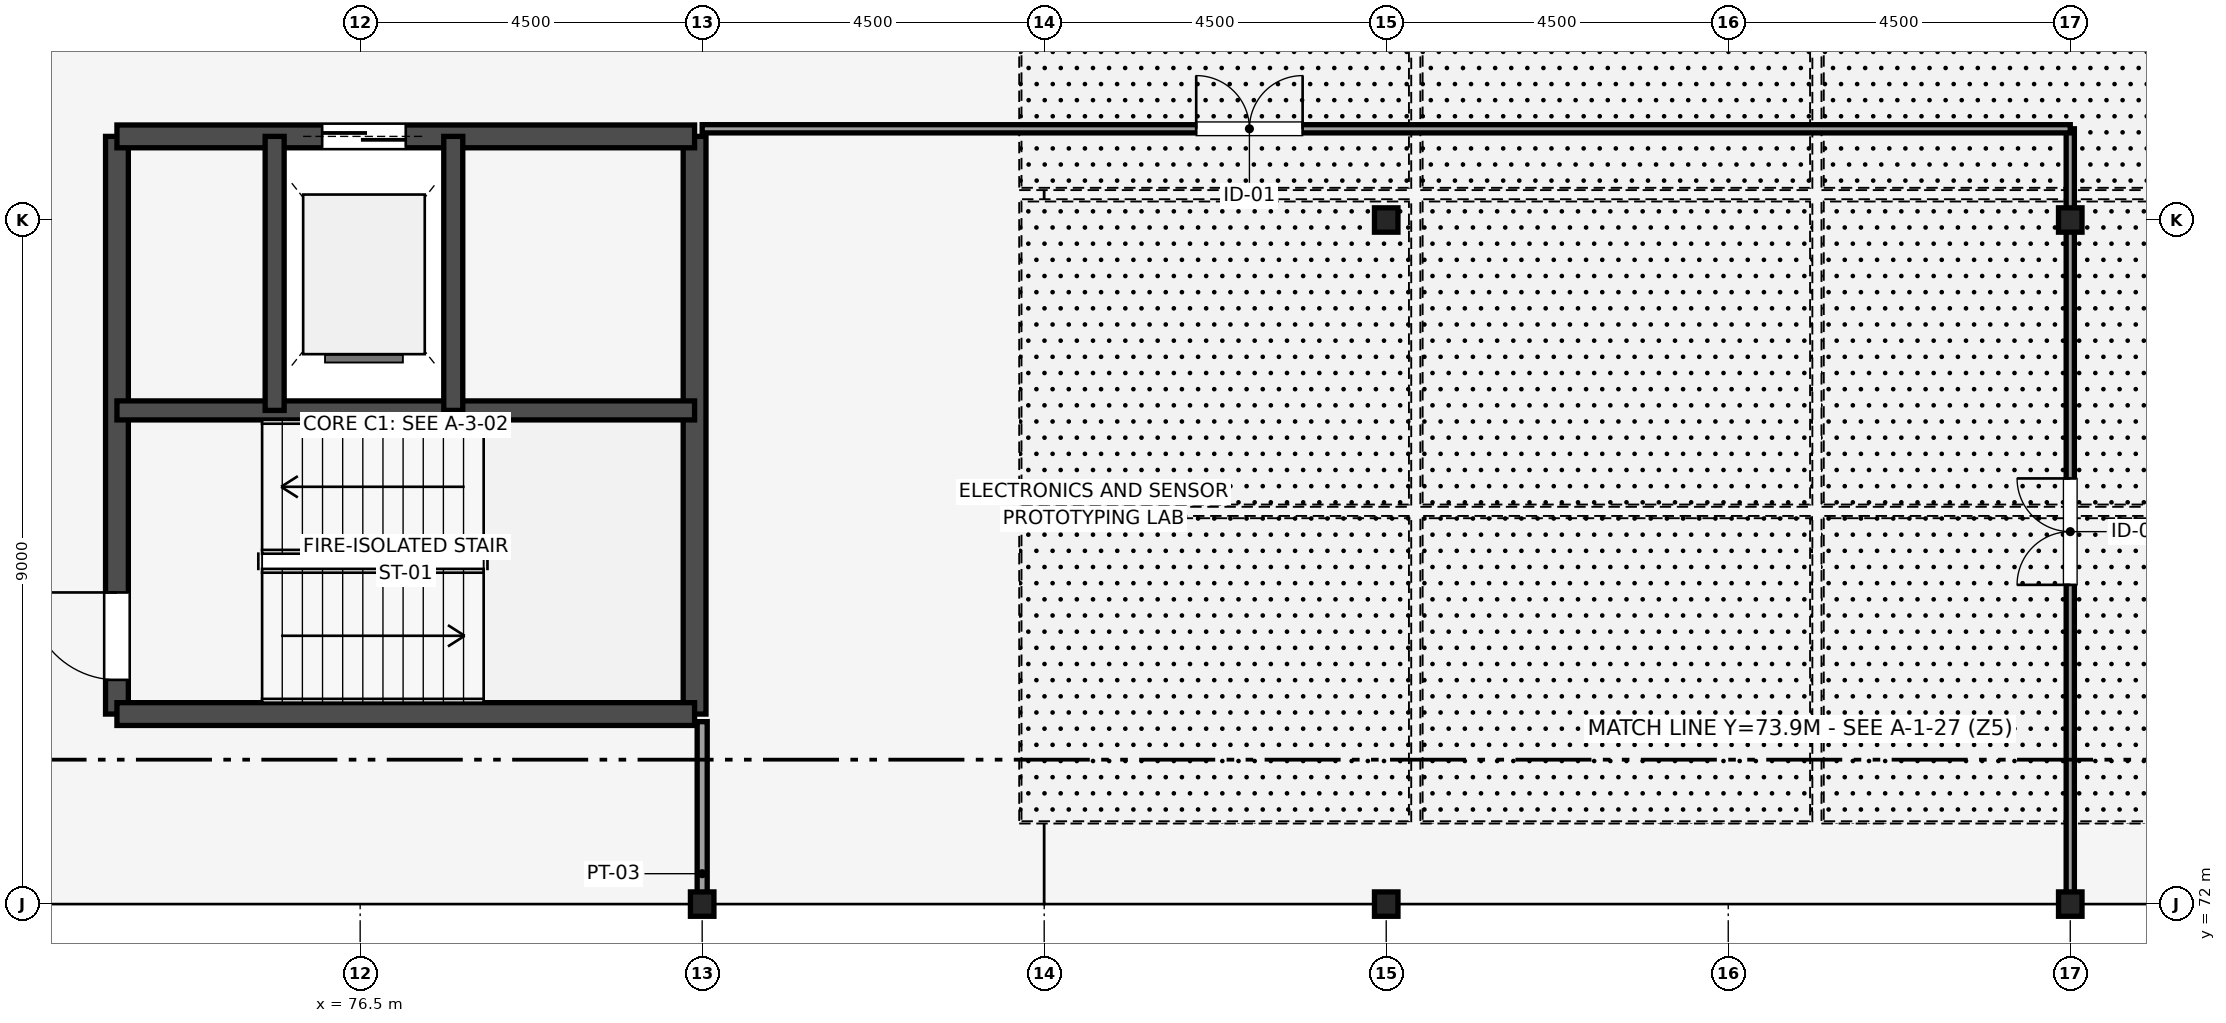
"""IFC4 building model, lengths in metres.
Left out: names, types, materials, properties, quantities, classifications, styles, units other than length and angle.
Written with IfcOpenShell. Run it as: python <this file> out.ifc"""

import sys

from ifc_helpers import new_model, si_unit, direction, frame, frame_2d, origin, origin_2d, place, context, subcontext, project, spatial, rectangle, i_section, extrude, element, fill, save


model = new_model("IFC4")
c1 = context("Model", 3, precision=1e-05, world=origin(), true_north=direction((0.0, 1.0)))
c2 = subcontext(c1, "Body", "Model", "MODEL_VIEW")
j1 = project(units=[si_unit("LENGTHUNIT", "METRE"), si_unit("PLANEANGLEUNIT", "RADIAN")], contexts=[c1])
p1 = place(None, origin())
s1 = spatial("IfcSite", under=j1, at=p1, CompositionType="ELEMENT")
p2 = place(p1, origin())
s2 = spatial("IfcBuilding", under=s1, at=p2, CompositionType="ELEMENT")
p3 = place(p2, frame((0.0, 0.0, 9.9)))
s3 = spatial("IfcBuildingStorey", under=s2, at=p3, CompositionType="ELEMENT", Elevation=9.9)
for number, where, z_axis, x_axis in (
    (1, (81.0, 72.0, 0.0), (0.0, 0.0, 1.0), (1.0, 0.0, 0.0)),
    (2, (90.0, 72.0, 0.0), (0.0, 0.0, 1.0), (1.0, 0.0, 0.0)),
    (3, (90.0, 81.0, 0.0), (0.0, 0.0, 1.0), (1.0, 0.0, 0.0)),
    (4, (99.0, 72.0, 0.0), (0.0, 0.0, 1.0), (1.0, 0.0, 0.0)),
    (5, (99.0, 81.0, 0.0), (0.0, 0.0, 1.0), (1.0, 0.0, 0.0)),
):
    element("IfcColumn", number, at=place(p3, frame(where, z_axis=z_axis, x_axis=x_axis)), inside=s3, PredefinedType="COLUMN", context=c2, shape_type="SweptSolid", body=[
        extrude(i_section(OverallWidth=0.309, OverallDepth=0.321, WebThickness=0.014, FlangeThickness=0.022, FilletRadius=0.017, at=origin_2d()), origin(), (0.0, 0.0, 1.0), 4.5),
    ])
p4 = place(p3, frame((73.3, 74.5, 0.0), z_axis=(0.0, 0.0, 1.0), x_axis=(0.0, 1.0, 0.0)))
e6 = element("IfcWall", 6, at=p4, inside=s3, PredefinedType="SHEAR", context=c2, shape_type="SweptSolid", body=[
    extrude(rectangle(XDim=7.6, YDim=0.3, at=frame_2d((3.8, 0.0))), origin(), (0.0, 0.0, 1.0), 4.5),
])
p5 = place(p4, frame((0.45, 0.0, 0.0)))
e7 = element("IfcOpeningElement", 7, at=p5, cuts=e6, PredefinedType="OPENING", context=c2, shape_type="SweptSolid", body=[
    extrude(rectangle(XDim=1.15, YDim=2.15, at=frame_2d((0.575, 1.075))), frame((0.0, 0.16, 0.0), z_axis=(0.0, -1.0, 0.0), x_axis=(1.0, 0.0, 0.0)), (0.0, 0.0, 1.0), 0.32),
])
p6 = place(p3, frame((80.9, 74.5, 0.0), z_axis=(0.0, 0.0, 1.0), x_axis=(0.0, 1.0, 0.0)))
e8 = element("IfcWall", 8, at=p6, inside=s3, PredefinedType="SHEAR", context=c2, shape_type="SweptSolid", body=[
    extrude(rectangle(XDim=7.6, YDim=0.3, at=frame_2d((3.8, 0.0))), origin(), (0.0, 0.0, 1.0), 4.5),
])
p7 = place(p3, frame((73.3, 74.5, 0.0), z_axis=(0.0, 0.0, 1.0), x_axis=(1.0, 0.0, 0.0)))
e9 = element("IfcWall", 9, at=p7, inside=s3, PredefinedType="SHEAR", context=c2, shape_type="SweptSolid", body=[
    extrude(rectangle(XDim=7.6, YDim=0.3, at=frame_2d((3.8, 0.0))), origin(), (0.0, 0.0, 1.0), 4.5),
])
p8 = place(p3, frame((73.3, 82.1, 0.0), z_axis=(0.0, 0.0, 1.0), x_axis=(1.0, 0.0, 0.0)))
e10 = element("IfcWall", 10, at=p8, inside=s3, PredefinedType="SHEAR", context=c2, shape_type="SweptSolid", body=[
    extrude(rectangle(XDim=7.6, YDim=0.3, at=frame_2d((3.8, 0.0))), origin(), (0.0, 0.0, 1.0), 4.5),
])
p9 = place(p8, frame((2.7, 0.0, 0.0)))
e11 = element("IfcOpeningElement", 11, at=p9, cuts=e10, PredefinedType="OPENING", context=c2, shape_type="SweptSolid", body=[
    extrude(rectangle(XDim=1.1, YDim=2.2, at=frame_2d((0.55, 1.1))), frame((0.0, 0.16, 0.0), z_axis=(0.0, -1.0, 0.0), x_axis=(1.0, 0.0, 0.0)), (0.0, 0.0, 1.0), 0.32),
])
p10 = place(p3, frame((73.3, 78.495, 0.0), z_axis=(0.0, 0.0, 1.0), x_axis=(1.0, 0.0, 0.0)))
e12 = element("IfcWall", 12, at=p10, inside=s3, PredefinedType="SHEAR", context=c2, shape_type="SweptSolid", body=[
    extrude(rectangle(XDim=7.6, YDim=0.25, at=frame_2d((3.8, 0.0))), origin(), (0.0, 0.0, 1.0), 4.5),
])
for number, where, z_axis, x_axis in (
    (13, (75.375, 78.495, 0.0), (0.0, 0.0, 1.0), (0.0, 1.0, 0.0)),
    (14, (77.725, 78.495, 0.0), (0.0, 0.0, 1.0), (0.0, 1.0, 0.0)),
):
    element("IfcWall", number, at=place(p3, frame(where, z_axis=z_axis, x_axis=x_axis)), inside=s3, PredefinedType="SHEAR", context=c2, shape_type="SweptSolid", body=[
        extrude(rectangle(XDim=3.605, YDim=0.25, at=frame_2d((1.802, 0.0))), origin(), (0.0, 0.0, 1.0), 4.5),
    ])
p11 = place(p3, frame((99.0, 72.0, 0.0), z_axis=(0.0, 0.0, 1.0), x_axis=(1.0, 0.0, 0.0)))
e15 = element("IfcWall", 15, at=p11, inside=s3, PredefinedType="STANDARD", context=c2, shape_type="SweptSolid", body=[
    extrude(rectangle(XDim=9.0, YDim=0.25, at=frame_2d((4.5, 0.0))), origin(), (0.0, 0.0, 1.0), 3.781),
])
p12 = place(p11, frame((3.5, 0.0, 0.0)))
e16 = element("IfcOpeningElement", 16, at=p12, cuts=e15, PredefinedType="OPENING", context=c2, shape_type="SweptSolid", body=[
    extrude(rectangle(XDim=2.0, YDim=2.5, at=frame_2d((1.0, 1.25))), frame((0.0, 0.135, 0.0), z_axis=(0.0, -1.0, 0.0), x_axis=(1.0, 0.0, 0.0)), (0.0, 0.0, 1.0), 0.27),
])
p13 = place(p3, frame((81.0, 72.0, 0.0), z_axis=(0.0, 0.0, 1.0), x_axis=(0.0, 1.0, 0.0)))
e17 = element("IfcWall", 17, at=p13, inside=s3, PredefinedType="PARTITIONING", context=c2, shape_type="SweptSolid", body=[
    extrude(rectangle(XDim=2.4, YDim=0.132, at=frame_2d((1.2, 0.0))), origin(), (0.0, 0.0, 1.0), 3.6),
])
p14 = place(p3, frame((99.0, 72.0, 0.0), z_axis=(0.0, 0.0, 1.0), x_axis=(0.0, 1.0, 0.0)))
e18 = element("IfcWall", 18, at=p14, inside=s3, PredefinedType="PARTITIONING", context=c2, shape_type="SweptSolid", body=[
    extrude(rectangle(XDim=10.2, YDim=0.108, at=frame_2d((5.1, 0.0))), origin(), (0.0, 0.0, 1.0), 3.772),
])
p15 = place(p14, frame((4.2, 0.0, 0.0)))
e19 = element("IfcOpeningElement", 19, at=p15, cuts=e18, PredefinedType="OPENING", context=c2, shape_type="SweptSolid", body=[
    extrude(rectangle(XDim=1.4, YDim=2.2, at=frame_2d((0.7, 1.1))), frame((0.0, 0.064, 0.0), z_axis=(0.0, -1.0, 0.0), x_axis=(1.0, 0.0, 0.0)), (0.0, 0.0, 1.0), 0.128),
])
p16 = place(p3, frame((81.0, 82.2, 0.0), z_axis=(0.0, 0.0, 1.0), x_axis=(1.0, 0.0, 0.0)))
e20 = element("IfcWall", 20, at=p16, inside=s3, PredefinedType="PARTITIONING", context=c2, shape_type="SweptSolid", body=[
    extrude(rectangle(XDim=18.0, YDim=0.108, at=frame_2d((9.0, 0.0))), origin(), (0.0, 0.0, 1.0), 4.32),
])
p17 = place(p16, frame((6.5, 0.0, 0.0)))
e21 = element("IfcOpeningElement", 21, at=p17, cuts=e20, PredefinedType="OPENING", context=c2, shape_type="SweptSolid", body=[
    extrude(rectangle(XDim=1.4, YDim=2.2, at=frame_2d((0.7, 1.1))), frame((0.0, 0.064, 0.0), z_axis=(0.0, -1.0, 0.0), x_axis=(1.0, 0.0, 0.0)), (0.0, 0.0, 1.0), 0.128),
])
p18 = place(p5, origin())
e22 = element("IfcDoor", 22, at=p18, inside=s3, OperationType="SINGLE_SWING_RIGHT", PredefinedType="DOOR", context=c2, shape_type="SweptSolid", body=[
    extrude(rectangle(XDim=1.15, YDim=2.15, at=frame_2d((0.575, 1.075))), frame((0.0, 0.025, 0.0), z_axis=(0.0, -1.0, 0.0), x_axis=(1.0, 0.0, 0.0)), (0.0, 0.0, 1.0), 0.05),
])
fill(e7, e22)
p19 = place(p9, origin())
e23 = element("IfcDoor", 23, at=p19, inside=s3, OperationType="DOUBLE_DOOR_SLIDING", PredefinedType="DOOR", context=c2, shape_type="SweptSolid", body=[
    extrude(rectangle(XDim=1.1, YDim=2.2, at=frame_2d((0.55, 1.1))), frame((0.0, 0.025, 0.0), z_axis=(0.0, -1.0, 0.0), x_axis=(1.0, 0.0, 0.0)), (0.0, 0.0, 1.0), 0.05),
])
fill(e11, e23)
p20 = place(p15, origin())
e24 = element("IfcDoor", 24, at=p20, inside=s3, OperationType="DOUBLE_DOOR_SINGLE_SWING", PredefinedType="DOOR", context=c2, shape_type="SweptSolid", body=[
    extrude(rectangle(XDim=1.4, YDim=2.2, at=frame_2d((0.7, 1.1))), frame((0.0, 0.025, 0.0), z_axis=(0.0, -1.0, 0.0), x_axis=(1.0, 0.0, 0.0)), (0.0, 0.0, 1.0), 0.05),
])
fill(e19, e24)
p21 = place(p17, origin())
e25 = element("IfcDoor", 25, at=p21, inside=s3, OperationType="DOUBLE_DOOR_SINGLE_SWING", PredefinedType="DOOR", context=c2, shape_type="SweptSolid", body=[
    extrude(rectangle(XDim=1.4, YDim=2.2, at=frame_2d((0.7, 1.1))), frame((0.0, 0.025, 0.0), z_axis=(0.0, -1.0, 0.0), x_axis=(1.0, 0.0, 0.0)), (0.0, 0.0, 1.0), 0.05),
])
fill(e21, e25)
save(model, sys.argv[1])
